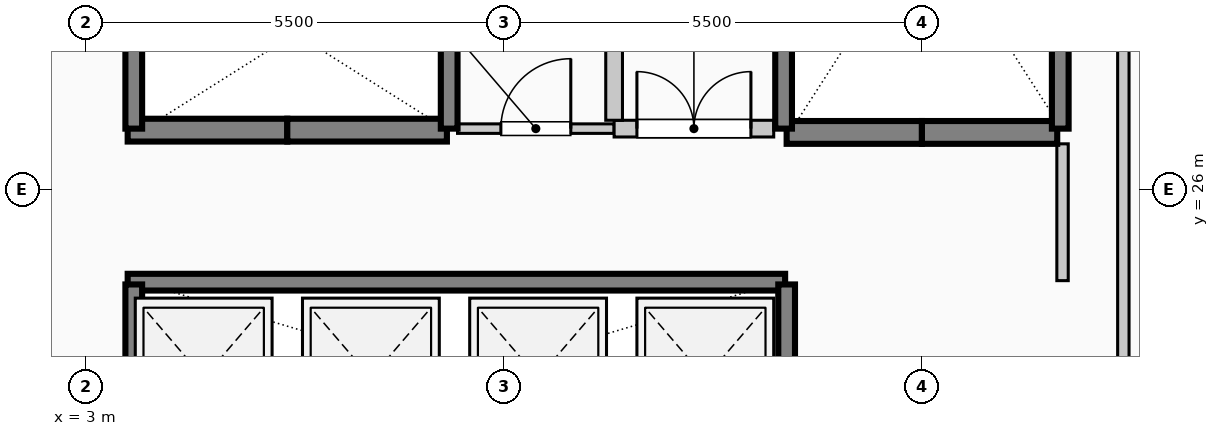
"""IFC4 building model, lengths in metres.
Left out: names, types, materials, properties, quantities, classifications, styles, units other than length and angle.
Written with IfcOpenShell. Run it as: python <this file> out.ifc"""

import sys

from ifc_helpers import new_model, si_unit, direction, frame, frame_2d, origin, place, context, subcontext, project, spatial, rectangle, extrude, element, fill, save


model = new_model("IFC4")
c1 = context("Model", 3, precision=1e-05, world=origin(), true_north=direction((0.0, 1.0)))
c2 = subcontext(c1, "Body", "Model", "MODEL_VIEW")
j1 = project(units=[si_unit("LENGTHUNIT", "METRE"), si_unit("PLANEANGLEUNIT", "RADIAN")], contexts=[c1])
p1 = place(None, origin())
s1 = spatial("IfcSite", under=j1, at=p1, CompositionType="ELEMENT")
p2 = place(p1, origin())
s2 = spatial("IfcBuilding", under=s1, at=p2, CompositionType="ELEMENT")
p3 = place(p2, frame((0.0, 0.0, 74.6)))
s3 = spatial("IfcBuildingStorey", under=s2, at=p3, CompositionType="ELEMENT", Elevation=74.6)
for number, where, z_axis, x_axis in (
    (1, (14.0, 26.75, 0.0), (0.0, 0.0, 1.0), (-1.0, 0.0, 0.0)),
    (2, (15.78, 26.75, 0.0), (0.0, 0.0, 1.0), (-1.0, 0.0, 0.0)),
):
    element("IfcWall", number, at=place(p3, frame(where, z_axis=z_axis, x_axis=x_axis)), inside=s3, PredefinedType="SOLIDWALL", context=c2, shape_type="SweptSolid", body=[
        extrude(rectangle(XDim=1.78, YDim=0.3, at=frame_2d((0.89, 0.0))), origin(), (0.0, 0.0, 1.0), 4.0),
    ])
p4 = place(p3, frame((5.65, 26.78, 0.0), z_axis=(0.0, 0.0, 1.0), x_axis=(-1.0, 0.0, 0.0)))
e3 = element("IfcWall", 3, at=p4, inside=s3, PredefinedType="SOLIDWALL", context=c2, shape_type="SweptSolid", body=[
    extrude(rectangle(XDim=2.1, YDim=0.3, at=frame_2d((1.05, 0.0))), origin(), (0.0, 0.0, 1.0), 4.0),
])
p5 = place(p3, frame((7.75, 26.78, 0.0), z_axis=(0.0, 0.0, 1.0), x_axis=(-1.0, 0.0, 0.0)))
e4 = element("IfcWall", 4, at=p5, inside=s3, PredefinedType="SOLIDWALL", context=c2, shape_type="SweptSolid", body=[
    extrude(rectangle(XDim=2.1, YDim=0.3, at=frame_2d((1.05, 0.0))), origin(), (0.0, 0.0, 1.0), 4.0),
])
p6 = place(p3, frame((3.63, 26.8, 0.0), z_axis=(0.0, 0.0, 1.0), x_axis=(0.0, 1.0, 0.0)))
e5 = element("IfcWall", 5, at=p6, inside=s3, PredefinedType="SOLIDWALL", context=c2, shape_type="SweptSolid", body=[
    extrude(rectangle(XDim=5.55, YDim=0.22, at=frame_2d((2.775, 0.0))), origin(), (0.0, 0.0, 1.0), 4.0),
])
p7 = place(p3, frame((7.78, 26.8, 0.0), z_axis=(0.0, 0.0, 1.0), x_axis=(0.0, 1.0, 0.0)))
e6 = element("IfcWall", 6, at=p7, inside=s3, PredefinedType="SOLIDWALL", context=c2, shape_type="SweptSolid", body=[
    extrude(rectangle(XDim=2.8, YDim=0.22, at=frame_2d((1.4, 0.0))), origin(), (0.0, 0.0, 1.0), 4.0),
])
for number, where, z_axis, x_axis in (
    (7, (12.18, 26.8, 0.0), (0.0, 0.0, 1.0), (0.0, 1.0, 0.0)),
    (8, (15.82, 26.8, 0.0), (0.0, 0.0, 1.0), (0.0, 1.0, 0.0)),
):
    element("IfcWall", number, at=place(p3, frame(where, z_axis=z_axis, x_axis=x_axis)), inside=s3, PredefinedType="SOLIDWALL", context=c2, shape_type="SweptSolid", body=[
        extrude(rectangle(XDim=5.45, YDim=0.22, at=frame_2d((2.725, 0.0))), origin(), (0.0, 0.0, 1.0), 4.0),
    ])
p8 = place(p3, frame((3.55, 24.78, 0.0), z_axis=(0.0, 0.0, 1.0), x_axis=(1.0, 0.0, 0.0)))
e9 = element("IfcWall", 9, at=p8, inside=s3, PredefinedType="SOLIDWALL", context=c2, shape_type="SweptSolid", body=[
    extrude(rectangle(XDim=8.65, YDim=0.22, at=frame_2d((4.325, 0.0))), origin(), (0.0, 0.0, 1.0), 4.0),
])
for number, where, z_axis, x_axis in (
    (10, (3.63, 22.3, 0.0), (0.0, 0.0, 1.0), (0.0, 1.0, 0.0)),
    (11, (12.22, 22.3, 0.0), (0.0, 0.0, 1.0), (0.0, 1.0, 0.0)),
):
    element("IfcWall", number, at=place(p3, frame(where, z_axis=z_axis, x_axis=x_axis)), inside=s3, PredefinedType="SOLIDWALL", context=c2, shape_type="SweptSolid", body=[
        extrude(rectangle(XDim=2.45, YDim=0.22, at=frame_2d((1.225, 0.0))), origin(), (0.0, 0.0, 1.0), 4.0),
    ])
p9 = place(p3, frame((7.89, 26.8, 0.0), z_axis=(0.0, 0.0, 1.0), x_axis=(1.0, 0.0, 0.0)))
e12 = element("IfcWall", 12, at=p9, inside=s3, PredefinedType="PARTITIONING", context=c2, shape_type="SweptSolid", body=[
    extrude(rectangle(XDim=2.06, YDim=0.125, at=frame_2d((1.03, 0.0))), origin(), (0.0, 0.0, 1.0), 3.7),
])
p10 = place(p9, frame((0.57, 0.0, 0.0)))
e13 = element("IfcOpeningElement", 13, at=p10, cuts=e12, PredefinedType="OPENING", context=c2, shape_type="SweptSolid", body=[
    extrude(rectangle(XDim=0.92, YDim=2.1, at=frame_2d((0.46, 1.05))), frame((0.0, 0.073, 0.0), z_axis=(0.0, -1.0, 0.0), x_axis=(1.0, 0.0, 0.0)), (0.0, 0.0, 1.0), 0.145),
])
p11 = place(p3, frame((9.95, 26.8, 0.0), z_axis=(0.0, 0.0, 1.0), x_axis=(1.0, 0.0, 0.0)))
e14 = element("IfcWall", 14, at=p11, inside=s3, PredefinedType="PARTITIONING", context=c2, shape_type="SweptSolid", body=[
    extrude(rectangle(XDim=2.1, YDim=0.22, at=frame_2d((1.05, 0.0))), origin(), (0.0, 0.0, 1.0), 3.7),
])
p12 = place(p11, frame((0.3, 0.0, 0.0)))
e15 = element("IfcOpeningElement", 15, at=p12, cuts=e14, PredefinedType="OPENING", context=c2, shape_type="SweptSolid", body=[
    extrude(rectangle(XDim=1.5, YDim=2.25, at=frame_2d((0.75, 1.125))), frame((0.0, 0.12, 0.0), z_axis=(0.0, -1.0, 0.0), x_axis=(1.0, 0.0, 0.0)), (0.0, 0.0, 1.0), 0.24),
])
p13 = place(p3, frame((9.95, 26.91, 0.0), z_axis=(0.0, 0.0, 1.0), x_axis=(0.0, 1.0, 0.0)))
e16 = element("IfcWall", 16, at=p13, inside=s3, PredefinedType="PARTITIONING", context=c2, shape_type="SweptSolid", body=[
    extrude(rectangle(XDim=2.73, YDim=0.22, at=frame_2d((1.365, 0.0))), origin(), (0.0, 0.0, 1.0), 3.7),
])
p14 = place(p3, frame((15.85, 24.8, 0.0), z_axis=(0.0, 0.0, 1.0), x_axis=(0.0, 1.0, 0.0)))
e17 = element("IfcWall", 17, at=p14, inside=s3, PredefinedType="PARTITIONING", context=c2, shape_type="SweptSolid", body=[
    extrude(rectangle(XDim=1.8, YDim=0.15, at=frame_2d((0.9, 0.0))), origin(), (0.0, 0.0, 1.0), 3.7),
])
p15 = place(p3, frame((16.65, 20.29, 0.0), z_axis=(0.0, 0.0, 1.0), x_axis=(0.0, 1.0, 0.0)))
e18 = element("IfcWall", 18, at=p15, inside=s3, PredefinedType="PARTITIONING", context=c2, shape_type="SweptSolid", body=[
    extrude(rectangle(XDim=7.835, YDim=0.15, at=frame_2d((3.917, 0.0))), origin(), (0.0, 0.0, 1.0), 2.995),
])
p16 = place(p10, origin())
e19 = element("IfcDoor", 19, at=p16, inside=s3, OperationType="SINGLE_SWING_RIGHT", PredefinedType="DOOR", context=c2, shape_type="SweptSolid", body=[
    extrude(rectangle(XDim=0.92, YDim=2.1, at=frame_2d((0.46, 1.05))), frame((0.0, 0.025, 0.0), z_axis=(0.0, -1.0, 0.0), x_axis=(1.0, 0.0, 0.0)), (0.0, 0.0, 1.0), 0.05),
])
fill(e13, e19)
p17 = place(p12, origin())
e20 = element("IfcDoor", 20, at=p17, inside=s3, OperationType="DOUBLE_DOOR_SINGLE_SWING", PredefinedType="DOOR", context=c2, shape_type="SweptSolid", body=[
    extrude(rectangle(XDim=1.5, YDim=2.25, at=frame_2d((0.75, 1.125))), frame((0.0, 0.025, 0.0), z_axis=(0.0, -1.0, 0.0), x_axis=(1.0, 0.0, 0.0)), (0.0, 0.0, 1.0), 0.05),
])
fill(e15, e20)
save(model, sys.argv[1])
